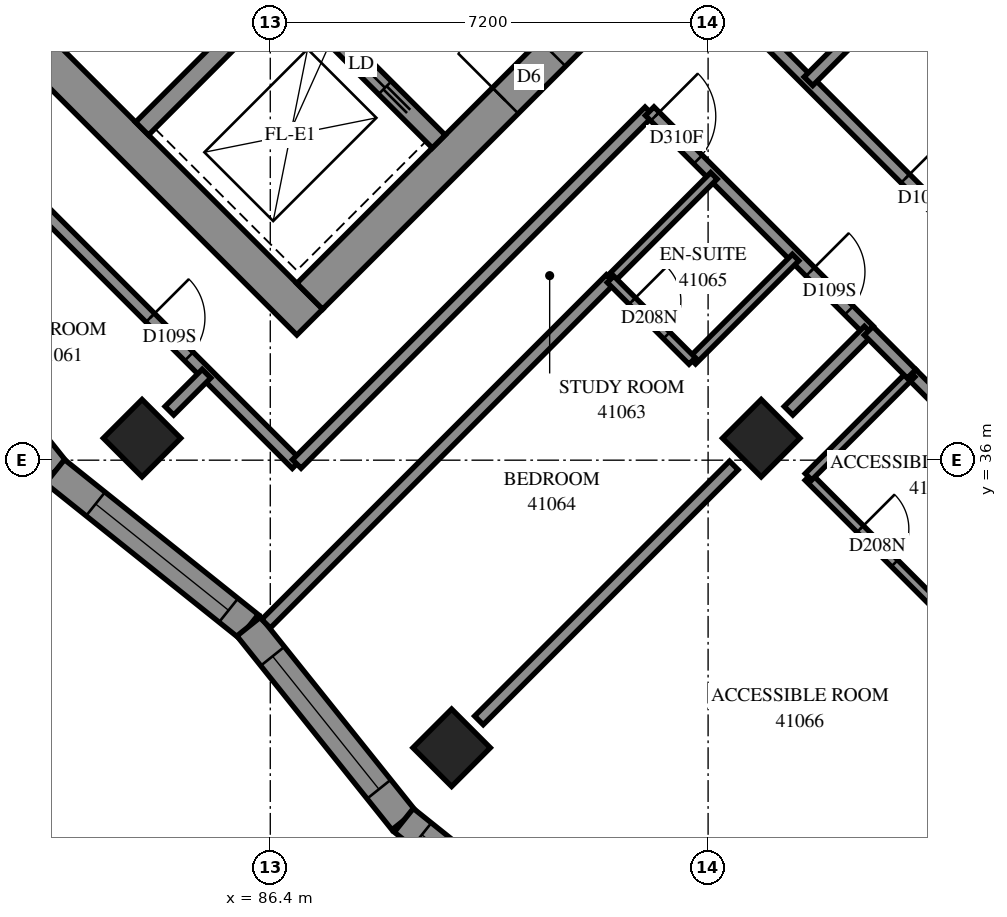
"""IFC4 building model, lengths in metres.
Left out: names, types, materials, properties, quantities, classifications, styles, units other than length and angle.
Written with IfcOpenShell. Run it as: python <this file> out.ifc"""

import sys

from ifc_helpers import new_model, si_unit, direction, frame, frame_2d, origin, origin_2d, place, context, subcontext, project, spatial, polyline, rectangle, outline, extrude, element, fill, save


model = new_model("IFC4")
c1 = context("Model", 3, precision=1e-05, world=origin(), true_north=direction((0.0, 1.0)))
c2 = subcontext(c1, "Body", "Model", "MODEL_VIEW")
j1 = project(units=[si_unit("LENGTHUNIT", "METRE"), si_unit("PLANEANGLEUNIT", "RADIAN")], contexts=[c1])
p1 = place(None, origin())
s1 = spatial("IfcSite", under=j1, at=p1, CompositionType="ELEMENT")
p2 = place(p1, origin())
s2 = spatial("IfcBuilding", under=s1, at=p2, CompositionType="ELEMENT")
p3 = place(p2, frame((0.0, 0.0, 152.4)))
s3 = spatial("IfcBuildingStorey", under=s2, at=p3, CompositionType="ELEMENT", Elevation=152.4)
for number, where, z_axis, x_axis in (
    (1, (84.291, 36.362, 0.0), (0.0, 0.0, 1.0), (0.707, -0.707, 0.0)),
    (2, (94.474, 36.362, 0.0), (0.0, 0.0, 1.0), (0.707, -0.707, 0.0)),
    (3, (89.382, 31.271, 0.0), (0.0, 0.0, 1.0), (0.707, -0.707, 0.0)),
):
    element("IfcColumn", number, at=place(p3, frame(where, z_axis=z_axis, x_axis=x_axis)), inside=s3, PredefinedType="COLUMN", context=c2, shape_type="SweptSolid", body=[
        extrude(rectangle(XDim=0.9, YDim=0.9, at=origin_2d()), origin(), (0.0, 0.0, 1.0), 3.1),
    ])
p4 = place(p3, frame((76.018, 49.302, -0.3), z_axis=(0.0, 0.0, 1.0), x_axis=(0.7071067812, -0.7071067812, 0.0)))
e4 = element("IfcWall", 4, at=p4, inside=s3, PredefinedType="SHEAR", context=c2, shape_type="SweptSolid", body=[
    extrude(rectangle(XDim=15.6, YDim=0.6, at=frame_2d((7.8, 0.0))), origin(), (0.0, 0.0, 1.0), 2.7),
])
p5 = place(p3, frame((87.049, 38.695, -0.3), z_axis=(0.0, 0.0, 1.0), x_axis=(0.7071067812, 0.7071067812, 0.0)))
e5 = element("IfcWall", 5, at=p5, inside=s3, PredefinedType="SHEAR", context=c2, shape_type="SweptSolid", body=[
    extrude(rectangle(XDim=14.4, YDim=0.6, at=frame_2d((7.2, 0.0))), origin(), (0.0, 0.0, 1.0), 2.7),
])
p6 = place(p5, frame((4.55, 0.0, 0.3)))
e6 = element("IfcOpeningElement", 6, at=p6, cuts=e5, PredefinedType="OPENING", context=c2, shape_type="SweptSolid", body=[
    extrude(rectangle(XDim=1.1, YDim=2.1, at=frame_2d((0.55, 1.05))), frame((0.0, 0.31, 0.0), z_axis=(0.0, -1.0, 0.0), x_axis=(1.0, 0.0, 0.0)), (0.0, 0.0, 1.0), 0.62),
])
p7 = place(p5, frame((11.35, 0.0, 0.3)))
e7 = element("IfcOpeningElement", 7, at=p7, cuts=e5, PredefinedType="OPENING", context=c2, shape_type="SweptSolid", body=[
    extrude(rectangle(XDim=1.1, YDim=2.1, at=frame_2d((0.55, 1.05))), frame((0.0, 0.31, 0.0), z_axis=(0.0, -1.0, 0.0), x_axis=(1.0, 0.0, 0.0)), (0.0, 0.0, 1.0), 0.62),
])
p8 = place(p3, frame((84.291, 41.453, 0.0), z_axis=(0.0, 0.0, 1.0), x_axis=(0.7071067812, 0.7071067812, 0.0)))
e8 = element("IfcWall", 8, at=p8, inside=s3, PredefinedType="SOLIDWALL", context=c2, shape_type="SweptSolid", body=[
    extrude(rectangle(XDim=3.3, YDim=0.3, at=frame_2d((1.65, 0.0))), origin(), (0.0, 0.0, 1.0), 3.1),
])
p9 = place(p3, frame((78.988, 51.423, 0.0), z_axis=(0.0, 0.0, 1.0), x_axis=(0.7071067812, -0.7071067812, 0.0)))
e9 = element("IfcWall", 9, at=p9, inside=s3, PredefinedType="SOLIDWALL", context=c2, shape_type="SweptSolid", body=[
    extrude(rectangle(XDim=14.4, YDim=0.3, at=frame_2d((7.2, 0.0))), origin(), (0.0, 0.0, 1.0), 3.1),
])
p10 = place(p9, frame((1.35, 0.0, 0.0)))
e10 = element("IfcOpeningElement", 10, at=p10, cuts=e9, PredefinedType="OPENING", context=c2, shape_type="SweptSolid", body=[
    extrude(rectangle(XDim=0.9, YDim=2.1, at=frame_2d((0.45, 1.05))), frame((0.0, 0.16, 0.0), z_axis=(0.0, -1.0, 0.0), x_axis=(1.0, 0.0, 0.0)), (0.0, 0.0, 1.0), 0.32),
])
p11 = place(p9, frame((4.95, 0.0, 0.0)))
e11 = element("IfcOpeningElement", 11, at=p11, cuts=e9, PredefinedType="OPENING", context=c2, shape_type="SweptSolid", body=[
    extrude(rectangle(XDim=0.9, YDim=2.1, at=frame_2d((0.45, 1.05))), frame((0.0, 0.16, 0.0), z_axis=(0.0, -1.0, 0.0), x_axis=(1.0, 0.0, 0.0)), (0.0, 0.0, 1.0), 0.32),
])
p12 = place(p9, frame((8.55, 0.0, 0.0)))
e12 = element("IfcOpeningElement", 12, at=p12, cuts=e9, PredefinedType="OPENING", context=c2, shape_type="SweptSolid", body=[
    extrude(rectangle(XDim=0.9, YDim=2.1, at=frame_2d((0.45, 1.05))), frame((0.0, 0.16, 0.0), z_axis=(0.0, -1.0, 0.0), x_axis=(1.0, 0.0, 0.0)), (0.0, 0.0, 1.0), 0.32),
])
p13 = place(p9, frame((12.05, 0.0, 0.0)))
e13 = element("IfcOpeningElement", 13, at=p13, cuts=e9, PredefinedType="OPENING", context=c2, shape_type="SweptSolid", body=[
    extrude(rectangle(XDim=1.1, YDim=2.1, at=frame_2d((0.55, 1.05))), frame((0.0, 0.16, 0.0), z_axis=(0.0, -1.0, 0.0), x_axis=(1.0, 0.0, 0.0)), (0.0, 0.0, 1.0), 0.32),
])
p14 = place(p3, frame((80.299, 39.016, 0.0), z_axis=(0.0, 0.0, 1.0), x_axis=(0.6246355526, -0.7809164017, 0.0)))
e14 = element("IfcWall", 14, at=p14, inside=s3, PredefinedType="SOLIDWALL", context=c2, shape_type="SweptSolid", body=[
    extrude(outline(polyline([(0.046, -0.25), (4.127, -0.25), (4.072, 0.25), (-0.046, 0.25), (0.046, -0.25)])), origin(), (0.0, 0.0, 1.0), 3.1),
])
p15 = place(p14, frame((1.889, 0.0, 0.45)))
e15 = element("IfcOpeningElement", 15, at=p15, cuts=e14, PredefinedType="OPENING", context=c2, shape_type="SweptSolid", body=[
    extrude(rectangle(XDim=1.2, YDim=2.5, at=frame_2d((0.6, 1.25))), frame((0.0, 0.26, 0.0), z_axis=(0.0, -1.0, 0.0), x_axis=(1.0, 0.0, 0.0)), (0.0, 0.0, 1.0), 0.52),
])
p16 = place(p3, frame((82.859, 35.815, 0.0), z_axis=(0.0, 0.0, 1.0), x_axis=(0.7809237862, -0.6246263204, 0.0)))
e16 = element("IfcWall", 16, at=p16, inside=s3, PredefinedType="SOLIDWALL", context=c2, shape_type="SweptSolid", body=[
    extrude(outline(polyline([(-0.028, -0.25), (4.054, -0.25), (4.109, 0.25), (0.028, 0.25), (-0.028, -0.25)])), origin(), (0.0, 0.0, 1.0), 3.1),
])
p17 = place(p16, frame((0.855, 0.0, 0.45)))
e17 = element("IfcOpeningElement", 17, at=p17, cuts=e16, PredefinedType="OPENING", context=c2, shape_type="SweptSolid", body=[
    extrude(rectangle(XDim=2.8, YDim=2.5, at=frame_2d((1.4, 1.25))), frame((0.0, 0.26, 0.0), z_axis=(0.0, -1.0, 0.0), x_axis=(1.0, 0.0, 0.0)), (0.0, 0.0, 1.0), 0.52),
])
p18 = place(p3, frame((86.046, 33.265, 0.0), z_axis=(0.0, 0.0, 1.0), x_axis=(0.6246412623, -0.7809118346, 0.0)))
e18 = element("IfcWall", 18, at=p18, inside=s3, PredefinedType="SOLIDWALL", context=c2, shape_type="SweptSolid", body=[
    extrude(outline(polyline([(0.028, -0.25), (4.109, -0.25), (4.054, 0.25), (-0.028, 0.25), (0.028, -0.25)])), origin(), (0.0, 0.0, 1.0), 3.1),
])
p19 = place(p18, frame((0.627, 0.0, 0.45)))
e19 = element("IfcOpeningElement", 19, at=p19, cuts=e18, PredefinedType="OPENING", context=c2, shape_type="SweptSolid", body=[
    extrude(rectangle(XDim=2.8, YDim=2.5, at=frame_2d((1.4, 1.25))), frame((0.0, 0.26, 0.0), z_axis=(0.0, -1.0, 0.0), x_axis=(1.0, 0.0, 0.0)), (0.0, 0.0, 1.0), 0.52),
])
p20 = place(p3, frame((88.596, 30.078, 0.0), z_axis=(0.0, 0.0, 1.0), x_axis=(0.7809068844, -0.6246474509, 0.0)))
e20 = element("IfcWall", 20, at=p20, inside=s3, PredefinedType="SOLIDWALL", context=c2, shape_type="SweptSolid", body=[
    extrude(outline(polyline([(-0.028, -0.25), (4.054, -0.25), (4.146, 0.25), (0.028, 0.25), (-0.028, -0.25)])), origin(), (0.0, 0.0, 1.0), 3.1),
])
p21 = place(p20, frame((0.381, 0.0, 0.45)))
e21 = element("IfcOpeningElement", 21, at=p21, cuts=e20, PredefinedType="OPENING", context=c2, shape_type="SweptSolid", body=[
    extrude(rectangle(XDim=2.8, YDim=2.5, at=frame_2d((1.4, 1.25))), frame((0.0, 0.26, 0.0), z_axis=(0.0, -1.0, 0.0), x_axis=(1.0, 0.0, 0.0)), (0.0, 0.0, 1.0), 0.52),
])
p22 = place(p3, frame((94.189, 43.287, 0.0), z_axis=(0.0, 0.0, 1.0), x_axis=(0.7071067812, -0.7071067812, 0.0)))
e22 = element("IfcWall", 22, at=p22, inside=s3, PredefinedType="PARTITIONING", context=c2, shape_type="SweptSolid", body=[
    extrude(rectangle(XDim=12.298, YDim=0.2, at=frame_2d((6.149, 0.0))), origin(), (0.0, 0.0, 1.0), 3.1),
])
p23 = place(p22, frame((3.755, 0.0, 0.0)))
e23 = element("IfcOpeningElement", 23, at=p23, cuts=e22, PredefinedType="OPENING", context=c2, shape_type="SweptSolid", body=[
    extrude(rectangle(XDim=0.9, YDim=2.1, at=frame_2d((0.45, 1.05))), frame((0.0, 0.11, 0.0), z_axis=(0.0, -1.0, 0.0), x_axis=(1.0, 0.0, 0.0)), (0.0, 0.0, 1.0), 0.22),
])
p24 = place(p22, frame((10.998, 0.0, 0.0)))
e24 = element("IfcOpeningElement", 24, at=p24, cuts=e22, PredefinedType="OPENING", context=c2, shape_type="SweptSolid", body=[
    extrude(rectangle(XDim=0.9, YDim=2.1, at=frame_2d((0.45, 1.05))), frame((0.0, 0.11, 0.0), z_axis=(0.0, -1.0, 0.0), x_axis=(1.0, 0.0, 0.0)), (0.0, 0.0, 1.0), 0.22),
])
p25 = place(p3, frame((95.25, 42.232, 0.0), z_axis=(0.0, 0.0, 1.0), x_axis=(0.7071114163, 0.707102146, 0.0)))
e25 = element("IfcWall", 25, at=p25, inside=s3, PredefinedType="PARTITIONING", context=c2, shape_type="SweptSolid", body=[
    extrude(rectangle(XDim=10.787, YDim=0.2, at=frame_2d((5.394, 0.0))), origin(), (0.0, 0.0, 1.0), 3.1),
])
p26 = place(p3, frame((80.899, 41.869, 0.0), z_axis=(0.0, 0.0, 1.0), x_axis=(0.7071067812, -0.7071067812, 0.0)))
e26 = element("IfcWall", 26, at=p26, inside=s3, PredefinedType="PARTITIONING", context=c2, shape_type="SweptSolid", body=[
    extrude(rectangle(XDim=8.392, YDim=0.2, at=frame_2d((4.196, 0.0))), origin(), (0.0, 0.0, 1.0), 3.1),
])
p27 = place(p26, frame((4.988, 0.0, 0.0)))
e27 = element("IfcOpeningElement", 27, at=p27, cuts=e26, PredefinedType="OPENING", context=c2, shape_type="SweptSolid", body=[
    extrude(rectangle(XDim=0.9, YDim=2.1, at=frame_2d((0.45, 1.05))), frame((0.0, 0.11, 0.0), z_axis=(0.0, -1.0, 0.0), x_axis=(1.0, 0.0, 0.0)), (0.0, 0.0, 1.0), 0.22),
])
p28 = place(p3, frame((86.836, 35.938, 0.0), z_axis=(0.0, 0.0, 1.0), x_axis=(0.7071067812, 0.7071067812, 0.0)))
e28 = element("IfcWall", 28, at=p28, inside=s3, PredefinedType="PARTITIONING", context=c2, shape_type="SweptSolid", body=[
    extrude(rectangle(XDim=8.2, YDim=0.2, at=frame_2d((4.1, 0.0))), origin(), (0.0, 0.0, 1.0), 3.1),
])
p29 = place(p3, frame((86.33, 33.311, 0.0), z_axis=(0.0, 0.0, 1.0), x_axis=(0.707100543, 0.7071130194, 0.0)))
e29 = element("IfcWall", 29, at=p29, inside=s3, PredefinedType="PARTITIONING", context=c2, shape_type="SweptSolid", body=[
    extrude(rectangle(XDim=8.015, YDim=0.2, at=frame_2d((4.008, 0.0))), origin(), (0.0, 0.0, 1.0), 3.1),
])
p30 = place(p3, frame((89.831, 31.721, 0.0), z_axis=(0.0, 0.0, 1.0), x_axis=(0.7071067812, 0.7071067812, 0.0)))
e30 = element("IfcWall", 30, at=p30, inside=s3, PredefinedType="PARTITIONING", context=c2, shape_type="SweptSolid", body=[
    extrude(rectangle(XDim=5.928, YDim=0.2, at=frame_2d((2.964, 0.0))), origin(), (0.0, 0.0, 1.0), 3.1),
])
p31 = place(p3, frame((94.923, 26.631, 0.0), z_axis=(0.0, 0.0, 1.0), x_axis=(0.7071067812, 0.7071067812, 0.0)))
e31 = element("IfcWall", 31, at=p31, inside=s3, PredefinedType="PARTITIONING", context=c2, shape_type="SweptSolid", body=[
    extrude(rectangle(XDim=5.926, YDim=0.2, at=frame_2d((2.963, 0.0))), origin(), (0.0, 0.0, 1.0), 2.6),
])
p32 = place(p3, frame((92.639, 41.739, 0.0), z_axis=(0.0, 0.0, 1.0), x_axis=(0.7071067812, -0.7071067812, 0.0)))
e32 = element("IfcWall", 32, at=p32, inside=s3, PredefinedType="PARTITIONING", context=c2, shape_type="SweptSolid", body=[
    extrude(rectangle(XDim=5.1, YDim=0.2, at=frame_2d((2.55, 0.0))), origin(), (0.0, 0.0, 1.0), 3.1),
])
p33 = place(p32, frame((0.123, 0.0, 0.0)))
e33 = element("IfcOpeningElement", 33, at=p33, cuts=e32, PredefinedType="OPENING", context=c2, shape_type="SweptSolid", body=[
    extrude(rectangle(XDim=1.0, YDim=2.1, at=frame_2d((0.5, 1.05))), frame((0.0, 0.11, 0.0), z_axis=(0.0, -1.0, 0.0), x_axis=(1.0, 0.0, 0.0)), (0.0, 0.0, 1.0), 0.22),
])
p34 = place(p32, frame((3.734, 0.0, 0.0)))
e34 = element("IfcOpeningElement", 34, at=p34, cuts=e32, PredefinedType="OPENING", context=c2, shape_type="SweptSolid", body=[
    extrude(rectangle(XDim=0.9, YDim=2.1, at=frame_2d((0.45, 1.05))), frame((0.0, 0.11, 0.0), z_axis=(0.0, -1.0, 0.0), x_axis=(1.0, 0.0, 0.0)), (0.0, 0.0, 1.0), 0.22),
])
p35 = place(p3, frame((95.249, 35.723, 0.0), z_axis=(0.0, 0.0, 1.0), x_axis=(0.7067942478, -0.7074191764, 0.0)))
e35 = element("IfcWall", 35, at=p35, inside=s3, PredefinedType="PARTITIONING", context=c2, shape_type="SweptSolid", body=[
    extrude(rectangle(XDim=3.2, YDim=0.15, at=frame_2d((1.6, 0.0))), origin(), (0.0, 0.0, 1.0), 3.1),
])
p36 = place(p35, frame((1.206, 0.0, 0.0)))
e36 = element("IfcOpeningElement", 36, at=p36, cuts=e35, PredefinedType="OPENING", context=c2, shape_type="SweptSolid", body=[
    extrude(rectangle(XDim=0.8, YDim=2.1, at=frame_2d((0.4, 1.05))), frame((0.0, 0.085, 0.0), z_axis=(0.0, -1.0, 0.0), x_axis=(1.0, 0.0, 0.0)), (0.0, 0.0, 1.0), 0.17),
])
p37 = place(p3, frame((96.945, 37.419, 0.0), z_axis=(0.0, 0.0, 1.0), x_axis=(0.7071067812, -0.7071067812, 0.0)))
e37 = element("IfcWall", 37, at=p37, inside=s3, PredefinedType="PARTITIONING", context=c2, shape_type="SweptSolid", body=[
    extrude(rectangle(XDim=2.927, YDim=0.2, at=frame_2d((1.464, 0.0))), origin(), (0.0, 0.0, 1.0), 3.1),
])
for number, where, z_axis, x_axis in (
    (38, (93.341, 37.635, 0.0), (0.0, 0.0, 1.0), (0.707, 0.707, 0.0)),
    (39, (91.997, 38.979, 0.0), (0.0, 0.0, 1.0), (0.707, 0.707, 0.0)),
):
    element("IfcWall", number, at=place(p3, frame(where, z_axis=z_axis, x_axis=x_axis)), inside=s3, PredefinedType="PARTITIONING", context=c2, shape_type="SweptSolid", body=[
        extrude(rectangle(XDim=2.401, YDim=0.15, at=frame_2d((1.201, 0.0))), origin(), (0.0, 0.0, 1.0), 3.1),
    ])
p38 = place(p3, frame((95.251, 35.727, 0.0), z_axis=(0.0, 0.0, 1.0), x_axis=(0.7071067812, 0.7071067812, 0.0)))
e40 = element("IfcWall", 40, at=p38, inside=s3, PredefinedType="PARTITIONING", context=c2, shape_type="SweptSolid", body=[
    extrude(rectangle(XDim=2.398, YDim=0.15, at=frame_2d((1.199, 0.0))), origin(), (0.0, 0.0, 1.0), 3.1),
])
p39 = place(p3, frame((91.995, 38.975, 0.0), z_axis=(0.0, 0.0, 1.0), x_axis=(0.7071067812, -0.7071067812, 0.0)))
e41 = element("IfcWall", 41, at=p39, inside=s3, PredefinedType="PARTITIONING", context=c2, shape_type="SweptSolid", body=[
    extrude(rectangle(XDim=1.901, YDim=0.15, at=frame_2d((0.95, 0.0))), origin(), (0.0, 0.0, 1.0), 3.1),
])
p40 = place(p39, frame((0.506, 0.0, 0.0)))
e42 = element("IfcOpeningElement", 42, at=p40, cuts=e41, PredefinedType="OPENING", context=c2, shape_type="SweptSolid", body=[
    extrude(rectangle(XDim=0.8, YDim=2.1, at=frame_2d((0.4, 1.05))), frame((0.0, 0.085, 0.0), z_axis=(0.0, -1.0, 0.0), x_axis=(1.0, 0.0, 0.0)), (0.0, 0.0, 1.0), 0.17),
])
p41 = place(p3, frame((94.923, 36.813, 0.0), z_axis=(0.0, 0.0, 1.0), x_axis=(0.7071067812, 0.7071067812, 0.0)))
e43 = element("IfcWall", 43, at=p41, inside=s3, PredefinedType="PARTITIONING", context=c2, shape_type="SweptSolid", body=[
    extrude(rectangle(XDim=1.864, YDim=0.2, at=frame_2d((0.932, 0.0))), origin(), (0.0, 0.0, 1.0), 3.1),
])
p42 = place(p3, frame((96.24, 38.128, 0.0), z_axis=(0.0, 0.0, 1.0), x_axis=(0.7061059238, -0.7081062239, 0.0)))
e44 = element("IfcWall", 44, at=p42, inside=s3, PredefinedType="PARTITIONING", context=c2, shape_type="SweptSolid", body=[
    extrude(rectangle(XDim=1.0, YDim=0.2, at=frame_2d((0.5, 0.0))), origin(), (0.0, 0.0, 1.0), 3.1),
])
p43 = place(p3, frame((84.741, 36.813, 0.0), z_axis=(0.0, 0.0, 1.0), x_axis=(0.7071067812, 0.7071067812, 0.0)))
e45 = element("IfcWall", 45, at=p43, inside=s3, PredefinedType="PARTITIONING", context=c2, shape_type="SweptSolid", body=[
    extrude(rectangle(XDim=0.863, YDim=0.2, at=frame_2d((0.431, 0.0))), origin(), (0.0, 0.0, 1.0), 3.1),
])
p44 = place(p17, origin())
e46 = element("IfcWindow", 46, at=p44, inside=s3, PartitioningType="SINGLE_PANEL", PredefinedType="WINDOW", context=c2, shape_type="SweptSolid", body=[
    extrude(rectangle(XDim=2.8, YDim=2.5, at=frame_2d((1.4, 1.25))), frame((0.0, 0.18, 0.0), z_axis=(0.0, -1.0, 0.0), x_axis=(1.0, 0.0, 0.0)), (0.0, 0.0, 1.0), 0.06),
])
fill(e17, e46)
p45 = place(p19, origin())
e47 = element("IfcWindow", 47, at=p45, inside=s3, PartitioningType="SINGLE_PANEL", PredefinedType="WINDOW", context=c2, shape_type="SweptSolid", body=[
    extrude(rectangle(XDim=2.8, YDim=2.5, at=frame_2d((1.4, 1.25))), frame((0.0, 0.18, 0.0), z_axis=(0.0, -1.0, 0.0), x_axis=(1.0, 0.0, 0.0)), (0.0, 0.0, 1.0), 0.06),
])
fill(e19, e47)
p46 = place(p21, origin())
e48 = element("IfcWindow", 48, at=p46, inside=s3, PartitioningType="SINGLE_PANEL", PredefinedType="WINDOW", context=c2, shape_type="SweptSolid", body=[
    extrude(rectangle(XDim=2.8, YDim=2.5, at=frame_2d((1.4, 1.25))), frame((0.0, 0.18, 0.0), z_axis=(0.0, -1.0, 0.0), x_axis=(1.0, 0.0, 0.0)), (0.0, 0.0, 1.0), 0.06),
])
fill(e21, e48)
p47 = place(p6, origin())
e49 = element("IfcDoor", 49, at=p47, inside=s3, OperationType="DOUBLE_DOOR_SINGLE_SWING", PredefinedType="DOOR", context=c2, shape_type="SweptSolid", body=[
    extrude(rectangle(XDim=1.1, YDim=2.1, at=frame_2d((0.55, 1.05))), frame((0.0, 0.025, 0.0), z_axis=(0.0, -1.0, 0.0), x_axis=(1.0, 0.0, 0.0)), (0.0, 0.0, 1.0), 0.05),
])
fill(e6, e49)
p48 = place(p13, origin())
e50 = element("IfcDoor", 50, at=p48, inside=s3, OperationType="SLIDING_TO_RIGHT", PredefinedType="DOOR", context=c2, shape_type="SweptSolid", body=[
    extrude(rectangle(XDim=1.1, YDim=2.1, at=frame_2d((0.55, 1.05))), frame((0.0, 0.025, 0.0), z_axis=(0.0, -1.0, 0.0), x_axis=(1.0, 0.0, 0.0)), (0.0, 0.0, 1.0), 0.05),
])
fill(e13, e50)
p49 = place(p23, origin())
e51 = element("IfcDoor", 51, at=p49, inside=s3, OperationType="SINGLE_SWING_RIGHT", PredefinedType="DOOR", context=c2, shape_type="SweptSolid", body=[
    extrude(rectangle(XDim=0.9, YDim=2.1, at=frame_2d((0.45, 1.05))), frame((0.0, 0.025, 0.0), z_axis=(0.0, -1.0, 0.0), x_axis=(1.0, 0.0, 0.0)), (0.0, 0.0, 1.0), 0.05),
])
fill(e23, e51)
p50 = place(p27, origin())
e52 = element("IfcDoor", 52, at=p50, inside=s3, OperationType="SINGLE_SWING_RIGHT", PredefinedType="DOOR", context=c2, shape_type="SweptSolid", body=[
    extrude(rectangle(XDim=0.9, YDim=2.1, at=frame_2d((0.45, 1.05))), frame((0.0, 0.025, 0.0), z_axis=(0.0, -1.0, 0.0), x_axis=(1.0, 0.0, 0.0)), (0.0, 0.0, 1.0), 0.05),
])
fill(e27, e52)
p51 = place(p33, origin())
e53 = element("IfcDoor", 53, at=p51, inside=s3, OperationType="SINGLE_SWING_RIGHT", PredefinedType="DOOR", context=c2, shape_type="SweptSolid", body=[
    extrude(rectangle(XDim=1.0, YDim=2.1, at=frame_2d((0.5, 1.05))), frame((0.0, 0.025, 0.0), z_axis=(0.0, -1.0, 0.0), x_axis=(1.0, 0.0, 0.0)), (0.0, 0.0, 1.0), 0.05),
])
fill(e33, e53)
p52 = place(p34, origin())
e54 = element("IfcDoor", 54, at=p52, inside=s3, OperationType="SINGLE_SWING_LEFT", PredefinedType="DOOR", context=c2, shape_type="SweptSolid", body=[
    extrude(rectangle(XDim=0.9, YDim=2.1, at=frame_2d((0.45, 1.05))), frame((0.0, 0.025, 0.0), z_axis=(0.0, -1.0, 0.0), x_axis=(1.0, 0.0, 0.0)), (0.0, 0.0, 1.0), 0.05),
])
fill(e34, e54)
p53 = place(p40, origin())
e55 = element("IfcDoor", 55, at=p53, inside=s3, OperationType="SINGLE_SWING_RIGHT", PredefinedType="DOOR", context=c2, shape_type="SweptSolid", body=[
    extrude(rectangle(XDim=0.8, YDim=2.1, at=frame_2d((0.4, 1.05))), frame((0.0, 0.025, 0.0), z_axis=(0.0, -1.0, 0.0), x_axis=(1.0, 0.0, 0.0)), (0.0, 0.0, 1.0), 0.05),
])
fill(e42, e55)
p54 = place(p36, origin())
e56 = element("IfcDoor", 56, at=p54, inside=s3, OperationType="SINGLE_SWING_RIGHT", PredefinedType="DOOR", context=c2, shape_type="SweptSolid", body=[
    extrude(rectangle(XDim=0.8, YDim=2.1, at=frame_2d((0.4, 1.05))), frame((0.0, 0.025, 0.0), z_axis=(0.0, -1.0, 0.0), x_axis=(1.0, 0.0, 0.0)), (0.0, 0.0, 1.0), 0.05),
])
fill(e36, e56)
save(model, sys.argv[1])
